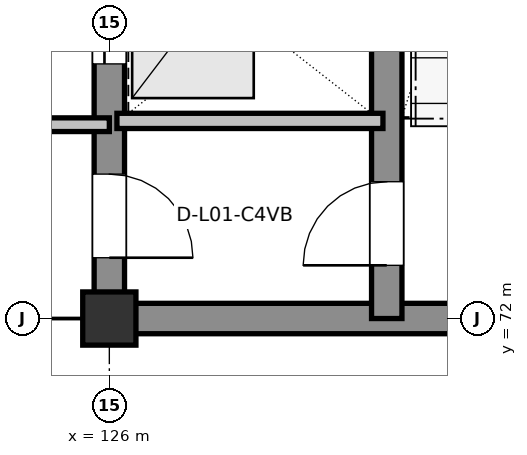
"""IFC4 building model, lengths in metres.
Left out: names, types, materials, properties, quantities, classifications, styles, units other than length and angle.
Written with IfcOpenShell. Run it as: python <this file> out.ifc"""

import sys

from ifc_helpers import new_model, si_unit, direction, frame, frame_2d, origin, origin_2d, place, context, subcontext, project, spatial, rectangle, extrude, element, fill, save


model = new_model("IFC4")
c1 = context("Model", 3, precision=1e-05, world=origin(), true_north=direction((0.0, 1.0)))
c2 = subcontext(c1, "Body", "Model", "MODEL_VIEW")
j1 = project(units=[si_unit("LENGTHUNIT", "METRE"), si_unit("PLANEANGLEUNIT", "RADIAN")], contexts=[c1])
p1 = place(None, origin())
s1 = spatial("IfcSite", under=j1, at=p1, CompositionType="ELEMENT")
p2 = place(p1, origin())
s2 = spatial("IfcBuilding", under=s1, at=p2, CompositionType="ELEMENT")
p3 = place(p2, frame((0.0, 0.0, 5.4)))
s3 = spatial("IfcBuildingStorey", under=s2, at=p3, CompositionType="ELEMENT", Elevation=5.4)
p4 = place(p3, frame((126.0, 72.0, 0.0), z_axis=(0.0, 0.0, 1.0), x_axis=(1.0, 0.0, 0.0)))
e1 = element("IfcColumn", 1, at=p4, inside=s3, PredefinedType="COLUMN", context=c2, shape_type="SweptSolid", body=[
    extrude(rectangle(XDim=0.7, YDim=0.7, at=origin_2d()), origin(), (0.0, 0.0, 1.0), 4.8),
])
p5 = place(p3, frame((126.0, 72.0, 0.0), z_axis=(0.0, 0.0, 1.0), x_axis=(1.0, 0.0, 0.0)))
e2 = element("IfcWall", 2, at=p5, inside=s3, PredefinedType="SHEAR", context=c2, shape_type="SweptSolid", body=[
    extrude(rectangle(XDim=9.0, YDim=0.4, at=frame_2d((4.5, 0.0))), origin(), (0.0, 0.0, 1.0), 4.56),
])
p6 = place(p3, frame((126.0, 90.0, 0.0), z_axis=(0.0, 0.0, 1.0), x_axis=(0.0, -1.0, 0.0)))
e3 = element("IfcWall", 3, at=p6, inside=s3, PredefinedType="SHEAR", context=c2, shape_type="SweptSolid", body=[
    extrude(rectangle(XDim=18.0, YDim=0.4, at=frame_2d((9.0, 0.0))), origin(), (0.0, 0.0, 1.0), 4.56),
])
p7 = place(p6, frame((16.1, 0.0, 0.0)))
e4 = element("IfcOpeningElement", 4, at=p7, cuts=e3, PredefinedType="OPENING", context=c2, shape_type="SweptSolid", body=[
    extrude(rectangle(XDim=1.1, YDim=2.16, at=frame_2d((0.55, 1.08))), frame((0.0, 0.21, 0.0), z_axis=(0.0, -1.0, 0.0), x_axis=(1.0, 0.0, 0.0)), (0.0, 0.0, 1.0), 0.42),
])
p8 = place(p6, frame((13.45, 0.0, 0.0)))
e5 = element("IfcOpeningElement", 5, at=p8, cuts=e3, PredefinedType="OPENING", context=c2, shape_type="SweptSolid", body=[
    extrude(rectangle(XDim=1.2, YDim=2.2, at=frame_2d((0.6, 1.1))), frame((0.0, 0.21, 0.0), z_axis=(0.0, -1.0, 0.0), x_axis=(1.0, 0.0, 0.0)), (0.0, 0.0, 1.0), 0.42),
])
p9 = place(p6, frame((10.65, 0.0, 0.0)))
e6 = element("IfcOpeningElement", 6, at=p9, cuts=e3, PredefinedType="OPENING", context=c2, shape_type="SweptSolid", body=[
    extrude(rectangle(XDim=1.2, YDim=2.2, at=frame_2d((0.6, 1.1))), frame((0.0, 0.21, 0.0), z_axis=(0.0, -1.0, 0.0), x_axis=(1.0, 0.0, 0.0)), (0.0, 0.0, 1.0), 0.42),
])
p10 = place(p6, frame((5.9, 0.0, 0.0)))
e7 = element("IfcOpeningElement", 7, at=p10, cuts=e3, PredefinedType="OPENING", context=c2, shape_type="SweptSolid", body=[
    extrude(rectangle(XDim=1.8, YDim=2.35, at=frame_2d((0.9, 1.175))), frame((0.0, 0.21, 0.0), z_axis=(0.0, -1.0, 0.0), x_axis=(1.0, 0.0, 0.0)), (0.0, 0.0, 1.0), 0.42),
])
p11 = place(p3, frame((129.65, 72.0, 0.0), z_axis=(0.0, 0.0, 1.0), x_axis=(0.0, 1.0, 0.0)))
e8 = element("IfcWall", 8, at=p11, inside=s3, PredefinedType="SHEAR", context=c2, shape_type="SweptSolid", body=[
    extrude(rectangle(XDim=18.0, YDim=0.4, at=frame_2d((9.0, 0.0))), origin(), (0.0, 0.0, 1.0), 4.56),
])
p12 = place(p11, frame((0.7, 0.0, 0.0)))
e9 = element("IfcOpeningElement", 9, at=p12, cuts=e8, PredefinedType="OPENING", context=c2, shape_type="SweptSolid", body=[
    extrude(rectangle(XDim=1.1, YDim=2.16, at=frame_2d((0.55, 1.08))), frame((0.0, 0.21, 0.0), z_axis=(0.0, -1.0, 0.0), x_axis=(1.0, 0.0, 0.0)), (0.0, 0.0, 1.0), 0.42),
])
p13 = place(p3, frame((126.1, 74.6, 0.0), z_axis=(0.0, 0.0, 1.0), x_axis=(1.0, 0.0, 0.0)))
e10 = element("IfcWall", 10, at=p13, inside=s3, PredefinedType="PARTITIONING", context=c2, shape_type="SweptSolid", body=[
    extrude(rectangle(XDim=3.5, YDim=0.2, at=frame_2d((1.75, 0.0))), origin(), (0.0, 0.0, 1.0), 4.56),
])
p14 = place(p3, frame((122.25, 74.55, 0.0), z_axis=(0.0, 0.0, 1.0), x_axis=(1.0, 0.0, 0.0)))
e11 = element("IfcWall", 11, at=p14, inside=s3, PredefinedType="PARTITIONING", context=c2, shape_type="SweptSolid", body=[
    extrude(rectangle(XDim=3.75, YDim=0.18, at=frame_2d((1.875, 0.0))), origin(), (0.0, 0.0, 1.0), 4.56),
])
p15 = place(p12, origin())
e12 = element("IfcDoor", 12, at=p15, inside=s3, OperationType="SINGLE_SWING_LEFT", PredefinedType="DOOR", context=c2, shape_type="SweptSolid", body=[
    extrude(rectangle(XDim=1.1, YDim=2.16, at=frame_2d((0.55, 1.08))), frame((0.0, 0.025, 0.0), z_axis=(0.0, -1.0, 0.0), x_axis=(1.0, 0.0, 0.0)), (0.0, 0.0, 1.0), 0.05),
])
fill(e9, e12)
p16 = place(p7, origin())
e13 = element("IfcDoor", 13, at=p16, inside=s3, OperationType="SINGLE_SWING_RIGHT", PredefinedType="DOOR", context=c2, shape_type="SweptSolid", body=[
    extrude(rectangle(XDim=1.1, YDim=2.16, at=frame_2d((0.55, 1.08))), frame((0.0, 0.025, 0.0), z_axis=(0.0, -1.0, 0.0), x_axis=(1.0, 0.0, 0.0)), (0.0, 0.0, 1.0), 0.05),
])
fill(e4, e13)
p17 = place(p8, origin())
e14 = element("IfcDoor", 14, at=p17, inside=s3, OperationType="SLIDING_TO_LEFT", PredefinedType="DOOR", context=c2, shape_type="SweptSolid", body=[
    extrude(rectangle(XDim=1.2, YDim=2.2, at=frame_2d((0.6, 1.1))), frame((0.0, 0.025, 0.0), z_axis=(0.0, -1.0, 0.0), x_axis=(1.0, 0.0, 0.0)), (0.0, 0.0, 1.0), 0.05),
])
fill(e5, e14)
save(model, sys.argv[1])
